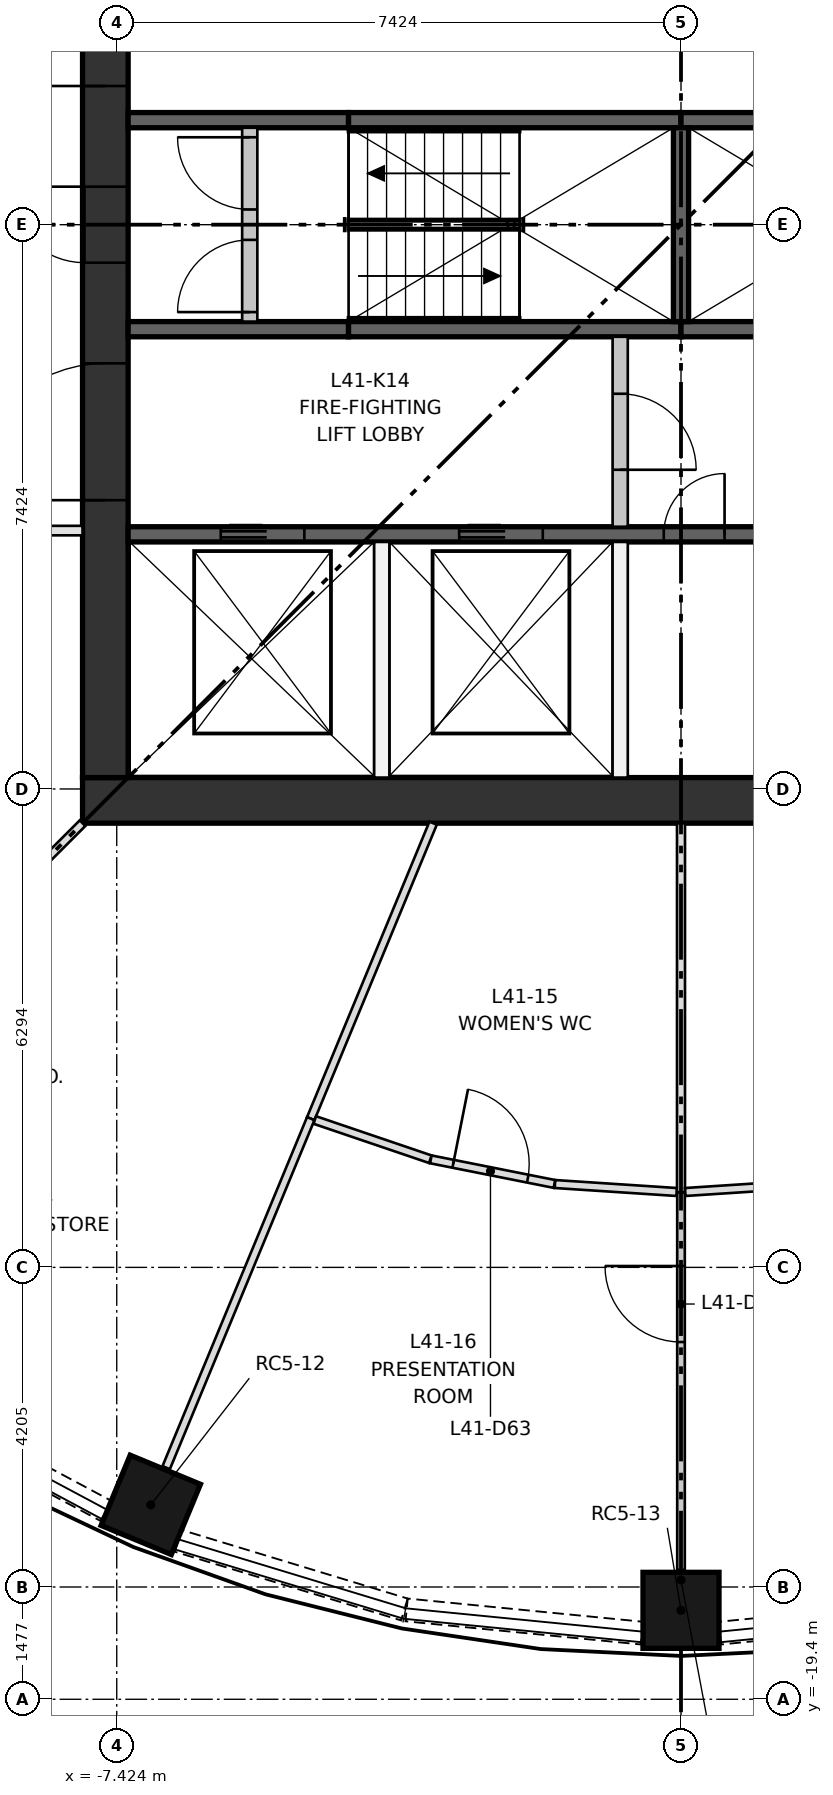
"""IFC4 building model, lengths in metres.
Left out: names, types, materials, properties, quantities, classifications, styles, units other than length and angle.
Written with IfcOpenShell. Run it as: python <this file> out.ifc"""

import sys

from ifc_helpers import new_model, si_unit, direction, frame, frame_2d, origin, origin_2d, place, context, subcontext, project, spatial, rectangle, extrude, element, fill, save


model = new_model("IFC4")
c1 = context("Model", 3, precision=1e-05, world=origin(), true_north=direction((0.0, 1.0)))
c2 = subcontext(c1, "Body", "Model", "MODEL_VIEW")
j1 = project(units=[si_unit("LENGTHUNIT", "METRE"), si_unit("PLANEANGLEUNIT", "RADIAN")], contexts=[c1])
p1 = place(None, origin())
s1 = spatial("IfcSite", under=j1, at=p1, CompositionType="ELEMENT")
p2 = place(p1, origin())
s2 = spatial("IfcBuilding", under=s1, at=p2, CompositionType="ELEMENT")
p3 = place(p2, frame((0.0, 0.0, 154.45)))
s3 = spatial("IfcBuildingStorey", under=s2, at=p3, CompositionType="ELEMENT", Elevation=154.45)
for number, where, z_axis, x_axis in (
    (1, (-6.976, -16.842, 0.0), (0.0, 0.0, 1.0), (-0.383, -0.924, 0.0)),
    (2, (0.0, -18.23, 0.0), (0.0, 0.0, 1.0), (0.0, -1.0, 0.0)),
):
    element("IfcColumn", number, at=place(p3, frame(where, z_axis=z_axis, x_axis=x_axis)), inside=s3, PredefinedType="COLUMN", context=c2, shape_type="SweptSolid", body=[
        extrude(rectangle(XDim=1.0, YDim=1.0, at=origin_2d()), origin(), (0.0, 0.0, 1.0), 3.35),
    ])
p4 = place(p3, frame((-7.874, -7.574, 0.0), z_axis=(0.0, 0.0, 1.0), x_axis=(1.0, 0.0, 0.0)))
e3 = element("IfcWall", 3, at=p4, inside=s3, PredefinedType="SHEAR", context=c2, shape_type="SweptSolid", body=[
    extrude(rectangle(XDim=15.748, YDim=0.6, at=frame_2d((7.874, 0.0))), origin(), (0.0, 0.0, 1.0), 3.35),
])
p5 = place(p3, frame((-7.574, -7.274, 0.0), z_axis=(0.0, 0.0, 1.0), x_axis=(0.0, 1.0, 0.0)))
e4 = element("IfcWall", 4, at=p5, inside=s3, PredefinedType="SHEAR", context=c2, shape_type="SweptSolid", body=[
    extrude(rectangle(XDim=14.548, YDim=0.6, at=frame_2d((7.274, 0.0))), origin(), (0.0, 0.0, 1.0), 3.35),
])
p6 = place(p5, frame((6.774, 0.0, 0.0)))
e5 = element("IfcOpeningElement", 5, at=p6, cuts=e4, PredefinedType="OPENING", context=c2, shape_type="SweptSolid", body=[
    extrude(rectangle(XDim=1.0, YDim=2.1, at=frame_2d((0.5, 1.05))), frame((0.0, 0.31, 0.0), z_axis=(0.0, -1.0, 0.0), x_axis=(1.0, 0.0, 0.0)), (0.0, 0.0, 1.0), 0.62),
])
p7 = place(p5, frame((3.649, 0.0, 0.0)))
e6 = element("IfcOpeningElement", 6, at=p7, cuts=e4, PredefinedType="OPENING", context=c2, shape_type="SweptSolid", body=[
    extrude(rectangle(XDim=1.8, YDim=2.1, at=frame_2d((0.9, 1.05))), frame((0.0, 0.31, 0.0), z_axis=(0.0, -1.0, 0.0), x_axis=(1.0, 0.0, 0.0)), (0.0, 0.0, 1.0), 0.62),
])
p8 = place(p5, frame((9.098, 0.0, 0.0)))
e7 = element("IfcOpeningElement", 7, at=p8, cuts=e4, PredefinedType="OPENING", context=c2, shape_type="SweptSolid", body=[
    extrude(rectangle(XDim=1.8, YDim=2.1, at=frame_2d((0.9, 1.05))), frame((0.0, 0.31, 0.0), z_axis=(0.0, -1.0, 0.0), x_axis=(1.0, 0.0, 0.0)), (0.0, 0.0, 1.0), 0.62),
])
p9 = place(p3, frame((-7.274, -4.074, 0.0), z_axis=(0.0, 0.0, 1.0), x_axis=(1.0, 0.0, 0.0)))
e8 = element("IfcWall", 8, at=p9, inside=s3, PredefinedType="SHEAR", context=c2, shape_type="SweptSolid", body=[
    extrude(rectangle(XDim=14.548, YDim=0.2, at=frame_2d((7.274, 0.0))), origin(), (0.0, 0.0, 1.0), 3.0),
])
p10 = place(p9, frame((1.219, 0.0, 0.0)))
e9 = element("IfcOpeningElement", 9, at=p10, cuts=e8, PredefinedType="OPENING", context=c2, shape_type="SweptSolid", body=[
    extrude(rectangle(XDim=1.1, YDim=2.1, at=frame_2d((0.55, 1.05))), frame((0.0, 0.11, 0.0), z_axis=(0.0, -1.0, 0.0), x_axis=(1.0, 0.0, 0.0)), (0.0, 0.0, 1.0), 0.22),
])
p11 = place(p9, frame((4.355, 0.0, 0.0)))
e10 = element("IfcOpeningElement", 10, at=p11, cuts=e8, PredefinedType="OPENING", context=c2, shape_type="SweptSolid", body=[
    extrude(rectangle(XDim=1.1, YDim=2.1, at=frame_2d((0.55, 1.05))), frame((0.0, 0.11, 0.0), z_axis=(0.0, -1.0, 0.0), x_axis=(1.0, 0.0, 0.0)), (0.0, 0.0, 1.0), 0.22),
])
p12 = place(p9, frame((7.047, 0.0, 0.0)))
e11 = element("IfcOpeningElement", 11, at=p12, cuts=e8, PredefinedType="OPENING", context=c2, shape_type="SweptSolid", body=[
    extrude(rectangle(XDim=0.8, YDim=2.1, at=frame_2d((0.4, 1.05))), frame((0.0, 0.11, 0.0), z_axis=(0.0, -1.0, 0.0), x_axis=(1.0, 0.0, 0.0)), (0.0, 0.0, 1.0), 0.22),
])
p13 = place(p9, frame((9.185, 0.0, 0.0)))
e12 = element("IfcOpeningElement", 12, at=p13, cuts=e8, PredefinedType="OPENING", context=c2, shape_type="SweptSolid", body=[
    extrude(rectangle(XDim=1.0, YDim=2.1, at=frame_2d((0.5, 1.05))), frame((0.0, 0.11, 0.0), z_axis=(0.0, -1.0, 0.0), x_axis=(1.0, 0.0, 0.0)), (0.0, 0.0, 1.0), 0.22),
])
p14 = place(p9, frame((11.228, 0.0, 0.0)))
e13 = element("IfcOpeningElement", 13, at=p14, cuts=e8, PredefinedType="OPENING", context=c2, shape_type="SweptSolid", body=[
    extrude(rectangle(XDim=1.0, YDim=2.1, at=frame_2d((0.5, 1.05))), frame((0.0, 0.11, 0.0), z_axis=(0.0, -1.0, 0.0), x_axis=(1.0, 0.0, 0.0)), (0.0, 0.0, 1.0), 0.22),
])
p15 = place(p9, frame((13.078, 0.0, 0.0)))
e14 = element("IfcOpeningElement", 14, at=p15, cuts=e8, PredefinedType="OPENING", context=c2, shape_type="SweptSolid", body=[
    extrude(rectangle(XDim=1.0, YDim=2.1, at=frame_2d((0.5, 1.05))), frame((0.0, 0.11, 0.0), z_axis=(0.0, -1.0, 0.0), x_axis=(1.0, 0.0, 0.0)), (0.0, 0.0, 1.0), 0.22),
])
p16 = place(p3, frame((-7.274, -1.375, 0.0), z_axis=(0.0, 0.0, 1.0), x_axis=(1.0, 0.0, 0.0)))
e15 = element("IfcWall", 15, at=p16, inside=s3, PredefinedType="SHEAR", context=c2, shape_type="SweptSolid", body=[
    extrude(rectangle(XDim=2.9, YDim=0.2, at=frame_2d((1.45, 0.0))), origin(), (0.0, 0.0, 1.0), 3.0),
])
for number, where, z_axis, x_axis in (
    (16, (-4.374, -1.375, 0.0), (0.0, 0.0, 1.0), (1.0, 0.0, 0.0)),
    (17, (0.0, -1.375, 0.0), (0.0, 0.0, 1.0), (1.0, 0.0, 0.0)),
):
    element("IfcWall", number, at=place(p3, frame(where, z_axis=z_axis, x_axis=x_axis)), inside=s3, PredefinedType="SHEAR", context=c2, shape_type="SweptSolid", body=[
        extrude(rectangle(XDim=4.374, YDim=0.2, at=frame_2d((2.187, 0.0))), origin(), (0.0, 0.0, 1.0), 3.0),
    ])
p17 = place(p3, frame((-7.274, 1.375, 0.0), z_axis=(0.0, 0.0, 1.0), x_axis=(1.0, 0.0, 0.0)))
e18 = element("IfcWall", 18, at=p17, inside=s3, PredefinedType="SHEAR", context=c2, shape_type="SweptSolid", body=[
    extrude(rectangle(XDim=2.9, YDim=0.2, at=frame_2d((1.45, 0.0))), origin(), (0.0, 0.0, 1.0), 3.0),
])
for number, where, z_axis, x_axis in (
    (19, (-4.374, 1.375, 0.0), (0.0, 0.0, 1.0), (1.0, 0.0, 0.0)),
    (20, (0.0, 1.375, 0.0), (0.0, 0.0, 1.0), (1.0, 0.0, 0.0)),
):
    element("IfcWall", number, at=place(p3, frame(where, z_axis=z_axis, x_axis=x_axis)), inside=s3, PredefinedType="SHEAR", context=c2, shape_type="SweptSolid", body=[
        extrude(rectangle(XDim=4.374, YDim=0.2, at=frame_2d((2.187, 0.0))), origin(), (0.0, 0.0, 1.0), 3.0),
    ])
p18 = place(p3, frame((0.0, -1.275, 0.0), z_axis=(0.0, 0.0, 1.0), x_axis=(0.0, 1.0, 0.0)))
e21 = element("IfcWall", 21, at=p18, inside=s3, PredefinedType="SHEAR", context=c2, shape_type="SweptSolid", body=[
    extrude(rectangle(XDim=2.55, YDim=0.2, at=frame_2d((1.275, 0.0))), origin(), (0.0, 0.0, 1.0), 3.0),
])
for number, where, z_axis, x_axis in (
    (22, (-3.937, -7.274, 0.0), (0.0, 0.0, 1.0), (0.0, 1.0, 0.0)),
    (23, (-0.8, -7.274, 0.0), (0.0, 0.0, 1.0), (0.0, 1.0, 0.0)),
):
    element("IfcWall", number, at=place(p3, frame(where, z_axis=z_axis, x_axis=x_axis)), inside=s3, PredefinedType="PARTITIONING", context=c2, shape_type="SweptSolid", body=[
        extrude(rectangle(XDim=3.1, YDim=0.2, at=frame_2d((1.55, 0.0))), origin(), (0.0, 0.0, 1.0), 3.0),
    ])
p19 = place(p3, frame((-0.8, -3.974, 0.0), z_axis=(0.0, 0.0, 1.0), x_axis=(0.0, 1.0, 0.0)))
e24 = element("IfcWall", 24, at=p19, inside=s3, PredefinedType="PARTITIONING", context=c2, shape_type="SweptSolid", body=[
    extrude(rectangle(XDim=2.499, YDim=0.2, at=frame_2d((1.25, 0.0))), origin(), (0.0, 0.0, 1.0), 3.0),
])
p20 = place(p19, frame((0.75, 0.0, 0.0)))
e25 = element("IfcOpeningElement", 25, at=p20, cuts=e24, PredefinedType="OPENING", context=c2, shape_type="SweptSolid", body=[
    extrude(rectangle(XDim=1.0, YDim=2.1, at=frame_2d((0.5, 1.05))), frame((0.0, 0.11, 0.0), z_axis=(0.0, -1.0, 0.0), x_axis=(1.0, 0.0, 0.0)), (0.0, 0.0, 1.0), 0.22),
])
p21 = place(p3, frame((-5.674, -1.275, 0.0), z_axis=(0.0, 0.0, 1.0), x_axis=(0.0, 1.0, 0.0)))
e26 = element("IfcWall", 26, at=p21, inside=s3, PredefinedType="PARTITIONING", context=c2, shape_type="SweptSolid", body=[
    extrude(rectangle(XDim=2.55, YDim=0.2, at=frame_2d((1.275, 0.0))), origin(), (0.0, 0.0, 1.0), 3.0),
])
p22 = place(p21, frame((0.125, 0.0, 0.0)))
e27 = element("IfcOpeningElement", 27, at=p22, cuts=e26, PredefinedType="OPENING", context=c2, shape_type="SweptSolid", body=[
    extrude(rectangle(XDim=0.95, YDim=2.1, at=frame_2d((0.475, 1.05))), frame((0.0, 0.11, 0.0), z_axis=(0.0, -1.0, 0.0), x_axis=(1.0, 0.0, 0.0)), (0.0, 0.0, 1.0), 0.22),
])
p23 = place(p21, frame((1.475, 0.0, 0.0)))
e28 = element("IfcOpeningElement", 28, at=p23, cuts=e26, PredefinedType="OPENING", context=c2, shape_type="SweptSolid", body=[
    extrude(rectangle(XDim=0.95, YDim=2.1, at=frame_2d((0.475, 1.05))), frame((0.0, 0.11, 0.0), z_axis=(0.0, -1.0, 0.0), x_axis=(1.0, 0.0, 0.0)), (0.0, 0.0, 1.0), 0.22),
])
p24 = place(p3, frame((-10.309, -15.455, 0.0), z_axis=(0.0, 0.0, 1.0), x_axis=(0.881883291798, -0.471467771589, 0.0)))
e29 = element("IfcWall", 29, at=p24, inside=s3, PredefinedType="SOLIDWALL", context=c2, shape_type="SweptSolid", body=[
    extrude(rectangle(XDim=3.111, YDim=0.3, at=frame_2d((1.556, 0.0))), origin(), (0.0, 0.0, 1.0), 0.9),
])
p25 = place(p3, frame((-6.617, -17.315, 0.0), z_axis=(0.0, 0.0, 1.0), x_axis=(0.956947154002, -0.29026219948, 0.0)))
e30 = element("IfcWall", 30, at=p25, inside=s3, PredefinedType="SOLIDWALL", context=c2, shape_type="SweptSolid", body=[
    extrude(rectangle(XDim=3.111, YDim=0.3, at=frame_2d((1.556, 0.0))), origin(), (0.0, 0.0, 1.0), 0.9),
])
for number, where, z_axis, x_axis in (
    (31, (-3.61, -18.225, 0.0), (0.0, 0.0, 1.0), (0.995, -0.098, 0.0)),
    (32, (0.514, -18.53, 0.0), (0.0, 0.0, 1.0), (0.995, 0.098, 0.0)),
):
    element("IfcWall", number, at=place(p3, frame(where, z_axis=z_axis, x_axis=x_axis)), inside=s3, PredefinedType="SOLIDWALL", context=c2, shape_type="SweptSolid", body=[
        extrude(rectangle(XDim=3.111, YDim=0.3, at=frame_2d((1.556, 0.0))), origin(), (0.0, 0.0, 1.0), 0.9),
    ])
p26 = place(p3, frame((-7.874, -4.024, 0.0), z_axis=(0.0, 0.0, 1.0), x_axis=(-1.0, 0.0, 0.0)))
e33 = element("IfcWall", 33, at=p26, inside=s3, PredefinedType="PARTITIONING", context=c2, shape_type="SweptSolid", body=[
    extrude(rectangle(XDim=3.771, YDim=0.125, at=frame_2d((1.886, 0.0))), origin(), (0.0, 0.0, 1.0), 3.0),
])
p27 = place(p26, frame((1.2, 0.0, 0.0)))
e34 = element("IfcOpeningElement", 34, at=p27, cuts=e33, PredefinedType="OPENING", context=c2, shape_type="SweptSolid", body=[
    extrude(rectangle(XDim=1.0, YDim=2.1, at=frame_2d((0.5, 1.05))), frame((0.0, 0.073, 0.0), z_axis=(0.0, -1.0, 0.0), x_axis=(1.0, 0.0, 0.0)), (0.0, 0.0, 1.0), 0.145),
])
p28 = place(p3, frame((-7.874, -7.874, 0.0), z_axis=(0.0, 0.0, 1.0), x_axis=(-0.707106781187, -0.707106781187, 0.0)))
e35 = element("IfcWall", 35, at=p28, inside=s3, PredefinedType="PARTITIONING", context=c2, shape_type="SweptSolid", body=[
    extrude(rectangle(XDim=6.564, YDim=0.105, at=frame_2d((3.282, 0.0))), origin(), (0.0, 0.0, 1.0), 3.0),
])
p29 = place(p28, frame((2.5, 0.0, 0.0)))
e36 = element("IfcOpeningElement", 36, at=p29, cuts=e35, PredefinedType="OPENING", context=c2, shape_type="SweptSolid", body=[
    extrude(rectangle(XDim=1.0, YDim=2.1, at=frame_2d((0.5, 1.05))), frame((0.0, 0.062, 0.0), z_axis=(0.0, -1.0, 0.0), x_axis=(1.0, 0.0, 0.0)), (0.0, 0.0, 1.0), 0.125),
])
p30 = place(p3, frame((-3.261, -7.874, 0.0), z_axis=(0.0, 0.0, 1.0), x_axis=(-0.38269858238, -0.923873257024, 0.0)))
e37 = element("IfcWall", 37, at=p30, inside=s3, PredefinedType="PARTITIONING", context=c2, shape_type="SweptSolid", body=[
    extrude(rectangle(XDim=4.207, YDim=0.105, at=frame_2d((2.104, 0.0))), origin(), (0.0, 0.0, 1.0), 3.0),
])
p31 = place(p3, frame((-4.872, -11.761, 0.0), z_axis=(0.0, 0.0, 1.0), x_axis=(-0.38266126553, -0.923888714003, 0.0)))
e38 = element("IfcWall", 38, at=p31, inside=s3, PredefinedType="PARTITIONING", context=c2, shape_type="SweptSolid", body=[
    extrude(rectangle(XDim=4.97, YDim=0.105, at=frame_2d((2.485, 0.0))), origin(), (0.0, 0.0, 1.0), 3.0),
])
p32 = place(p3, frame((-3.298, -12.295, 0.0), z_axis=(0.0, 0.0, 1.0), x_axis=(-0.946935734923, 0.321422951771, 0.0)))
e39 = element("IfcWall", 39, at=p32, inside=s3, PredefinedType="PARTITIONING", context=c2, shape_type="SweptSolid", body=[
    extrude(rectangle(XDim=1.606, YDim=0.105, at=frame_2d((0.803, 0.0))), origin(), (0.0, 0.0, 1.0), 3.0),
])
p33 = place(p3, frame((-3.292, -12.297, 0.0), z_axis=(0.0, 0.0, 1.0), x_axis=(0.980789623675, -0.195068485645, 0.0)))
e40 = element("IfcWall", 40, at=p33, inside=s3, PredefinedType="PARTITIONING", context=c2, shape_type="SweptSolid", body=[
    extrude(rectangle(XDim=1.658, YDim=0.105, at=frame_2d((0.829, 0.0))), origin(), (0.0, 0.0, 1.0), 3.0),
])
p34 = place(p33, frame((0.3, 0.0, 0.0)))
e41 = element("IfcOpeningElement", 41, at=p34, cuts=e40, PredefinedType="OPENING", context=c2, shape_type="SweptSolid", body=[
    extrude(rectangle(XDim=1.0, YDim=2.1, at=frame_2d((0.5, 1.05))), frame((0.0, 0.062, 0.0), z_axis=(0.0, -1.0, 0.0), x_axis=(1.0, 0.0, 0.0)), (0.0, 0.0, 1.0), 0.125),
])
p35 = place(p3, frame((-0.056, -12.726, 0.0), z_axis=(0.0, 0.0, 1.0), x_axis=(-0.997860527919, 0.065378641933, 0.0)))
e42 = element("IfcWall", 42, at=p35, inside=s3, PredefinedType="PARTITIONING", context=c2, shape_type="SweptSolid", body=[
    extrude(rectangle(XDim=1.606, YDim=0.105, at=frame_2d((0.803, 0.0))), origin(), (0.0, 0.0, 1.0), 3.0),
])
p36 = place(p3, frame((0.0, -7.874, 0.0), z_axis=(0.0, 0.0, 1.0), x_axis=(0.0, -1.0, 0.0)))
e43 = element("IfcWall", 43, at=p36, inside=s3, PredefinedType="PARTITIONING", context=c2, shape_type="SweptSolid", body=[
    extrude(rectangle(XDim=4.856, YDim=0.105, at=frame_2d((2.428, 0.0))), origin(), (0.0, 0.0, 1.0), 3.0),
])
p37 = place(p3, frame((0.0, -17.7, 0.0), z_axis=(0.0, 0.0, 1.0), x_axis=(0.0, 1.0, 0.0)))
e44 = element("IfcWall", 44, at=p37, inside=s3, PredefinedType="PARTITIONING", context=c2, shape_type="SweptSolid", body=[
    extrude(rectangle(XDim=4.97, YDim=0.1, at=frame_2d((2.485, 0.0))), origin(), (0.0, 0.0, 1.0), 3.0),
])
p38 = place(p37, frame((3.0, 0.0, 0.0)))
e45 = element("IfcOpeningElement", 45, at=p38, cuts=e44, PredefinedType="OPENING", context=c2, shape_type="SweptSolid", body=[
    extrude(rectangle(XDim=1.0, YDim=2.1, at=frame_2d((0.5, 1.05))), frame((0.0, 0.06, 0.0), z_axis=(0.0, -1.0, 0.0), x_axis=(1.0, 0.0, 0.0)), (0.0, 0.0, 1.0), 0.12),
])
p39 = place(p3, frame((1.658, -12.621, 0.0), z_axis=(0.0, 0.0, 1.0), x_axis=(-0.997860527919, -0.065378641933, 0.0)))
e46 = element("IfcWall", 46, at=p39, inside=s3, PredefinedType="PARTITIONING", context=c2, shape_type="SweptSolid", body=[
    extrude(rectangle(XDim=1.606, YDim=0.105, at=frame_2d((0.803, 0.0))), origin(), (0.0, 0.0, 1.0), 3.0),
])
p40 = place(p10, origin())
e47 = element("IfcDoor", 47, at=p40, inside=s3, OperationType="DOUBLE_DOOR_SLIDING", PredefinedType="DOOR", context=c2, shape_type="SweptSolid", body=[
    extrude(rectangle(XDim=1.1, YDim=2.1, at=frame_2d((0.55, 1.05))), frame((0.0, 0.025, 0.0), z_axis=(0.0, -1.0, 0.0), x_axis=(1.0, 0.0, 0.0)), (0.0, 0.0, 1.0), 0.05),
])
fill(e9, e47)
p41 = place(p11, origin())
e48 = element("IfcDoor", 48, at=p41, inside=s3, OperationType="DOUBLE_DOOR_SLIDING", PredefinedType="DOOR", context=c2, shape_type="SweptSolid", body=[
    extrude(rectangle(XDim=1.1, YDim=2.1, at=frame_2d((0.55, 1.05))), frame((0.0, 0.025, 0.0), z_axis=(0.0, -1.0, 0.0), x_axis=(1.0, 0.0, 0.0)), (0.0, 0.0, 1.0), 0.05),
])
fill(e10, e48)
p42 = place(p22, origin())
e49 = element("IfcDoor", 49, at=p42, inside=s3, OperationType="SINGLE_SWING_LEFT", PredefinedType="DOOR", context=c2, shape_type="SweptSolid", body=[
    extrude(rectangle(XDim=0.95, YDim=2.1, at=frame_2d((0.475, 1.05))), frame((0.0, 0.025, 0.0), z_axis=(0.0, -1.0, 0.0), x_axis=(1.0, 0.0, 0.0)), (0.0, 0.0, 1.0), 0.05),
])
fill(e27, e49)
p43 = place(p23, origin())
e50 = element("IfcDoor", 50, at=p43, inside=s3, OperationType="SINGLE_SWING_RIGHT", PredefinedType="DOOR", context=c2, shape_type="SweptSolid", body=[
    extrude(rectangle(XDim=0.95, YDim=2.1, at=frame_2d((0.475, 1.05))), frame((0.0, 0.025, 0.0), z_axis=(0.0, -1.0, 0.0), x_axis=(1.0, 0.0, 0.0)), (0.0, 0.0, 1.0), 0.05),
])
fill(e28, e50)
p44 = place(p20, frame((1.0, 0.0, 0.0), z_axis=(0.0, 0.0, 1.0), x_axis=(-1.0, 0.0, 0.0)))
e51 = element("IfcDoor", 51, at=p44, inside=s3, OperationType="SINGLE_SWING_LEFT", PredefinedType="DOOR", context=c2, shape_type="SweptSolid", body=[
    extrude(rectangle(XDim=1.0, YDim=2.1, at=frame_2d((0.5, 1.05))), frame((0.0, 0.025, 0.0), z_axis=(0.0, -1.0, 0.0), x_axis=(1.0, 0.0, 0.0)), (0.0, 0.0, 1.0), 0.05),
])
fill(e25, e51)
p45 = place(p12, origin())
e52 = element("IfcDoor", 52, at=p45, inside=s3, OperationType="SINGLE_SWING_RIGHT", PredefinedType="DOOR", context=c2, shape_type="SweptSolid", body=[
    extrude(rectangle(XDim=0.8, YDim=2.1, at=frame_2d((0.4, 1.05))), frame((0.0, 0.025, 0.0), z_axis=(0.0, -1.0, 0.0), x_axis=(1.0, 0.0, 0.0)), (0.0, 0.0, 1.0), 0.05),
])
fill(e11, e52)
p46 = place(p6, origin())
e53 = element("IfcDoor", 53, at=p46, inside=s3, OperationType="SINGLE_SWING_RIGHT", PredefinedType="DOOR", context=c2, shape_type="SweptSolid", body=[
    extrude(rectangle(XDim=1.0, YDim=2.1, at=frame_2d((0.5, 1.05))), frame((0.0, 0.3, 0.0), z_axis=(0.0, -1.0, 0.0), x_axis=(1.0, 0.0, 0.0)), (0.0, 0.0, 1.0), 0.05),
])
fill(e5, e53)
p47 = place(p7, origin())
e54 = element("IfcDoor", 54, at=p47, inside=s3, OperationType="DOUBLE_DOOR_SINGLE_SWING", PredefinedType="DOOR", context=c2, shape_type="SweptSolid", body=[
    extrude(rectangle(XDim=1.8, YDim=2.1, at=frame_2d((0.9, 1.05))), frame((0.0, 0.025, 0.0), z_axis=(0.0, -1.0, 0.0), x_axis=(1.0, 0.0, 0.0)), (0.0, 0.0, 1.0), 0.05),
])
fill(e6, e54)
p48 = place(p8, origin())
e55 = element("IfcDoor", 55, at=p48, inside=s3, OperationType="DOUBLE_DOOR_SINGLE_SWING", PredefinedType="DOOR", context=c2, shape_type="SweptSolid", body=[
    extrude(rectangle(XDim=1.8, YDim=2.1, at=frame_2d((0.9, 1.05))), frame((0.0, 0.025, 0.0), z_axis=(0.0, -1.0, 0.0), x_axis=(1.0, 0.0, 0.0)), (0.0, 0.0, 1.0), 0.05),
])
fill(e7, e55)
p49 = place(p34, origin())
e56 = element("IfcDoor", 56, at=p49, inside=s3, OperationType="SINGLE_SWING_LEFT", PredefinedType="DOOR", context=c2, shape_type="SweptSolid", body=[
    extrude(rectangle(XDim=1.0, YDim=2.1, at=frame_2d((0.5, 1.05))), frame((0.0, 0.025, 0.0), z_axis=(0.0, -1.0, 0.0), x_axis=(1.0, 0.0, 0.0)), (0.0, 0.0, 1.0), 0.05),
])
fill(e41, e56)
p50 = place(p38, origin())
e57 = element("IfcDoor", 57, at=p50, inside=s3, OperationType="SINGLE_SWING_RIGHT", PredefinedType="DOOR", context=c2, shape_type="SweptSolid", body=[
    extrude(rectangle(XDim=1.0, YDim=2.1, at=frame_2d((0.5, 1.05))), frame((0.0, 0.025, 0.0), z_axis=(0.0, -1.0, 0.0), x_axis=(1.0, 0.0, 0.0)), (0.0, 0.0, 1.0), 0.05),
])
fill(e45, e57)
save(model, sys.argv[1])
